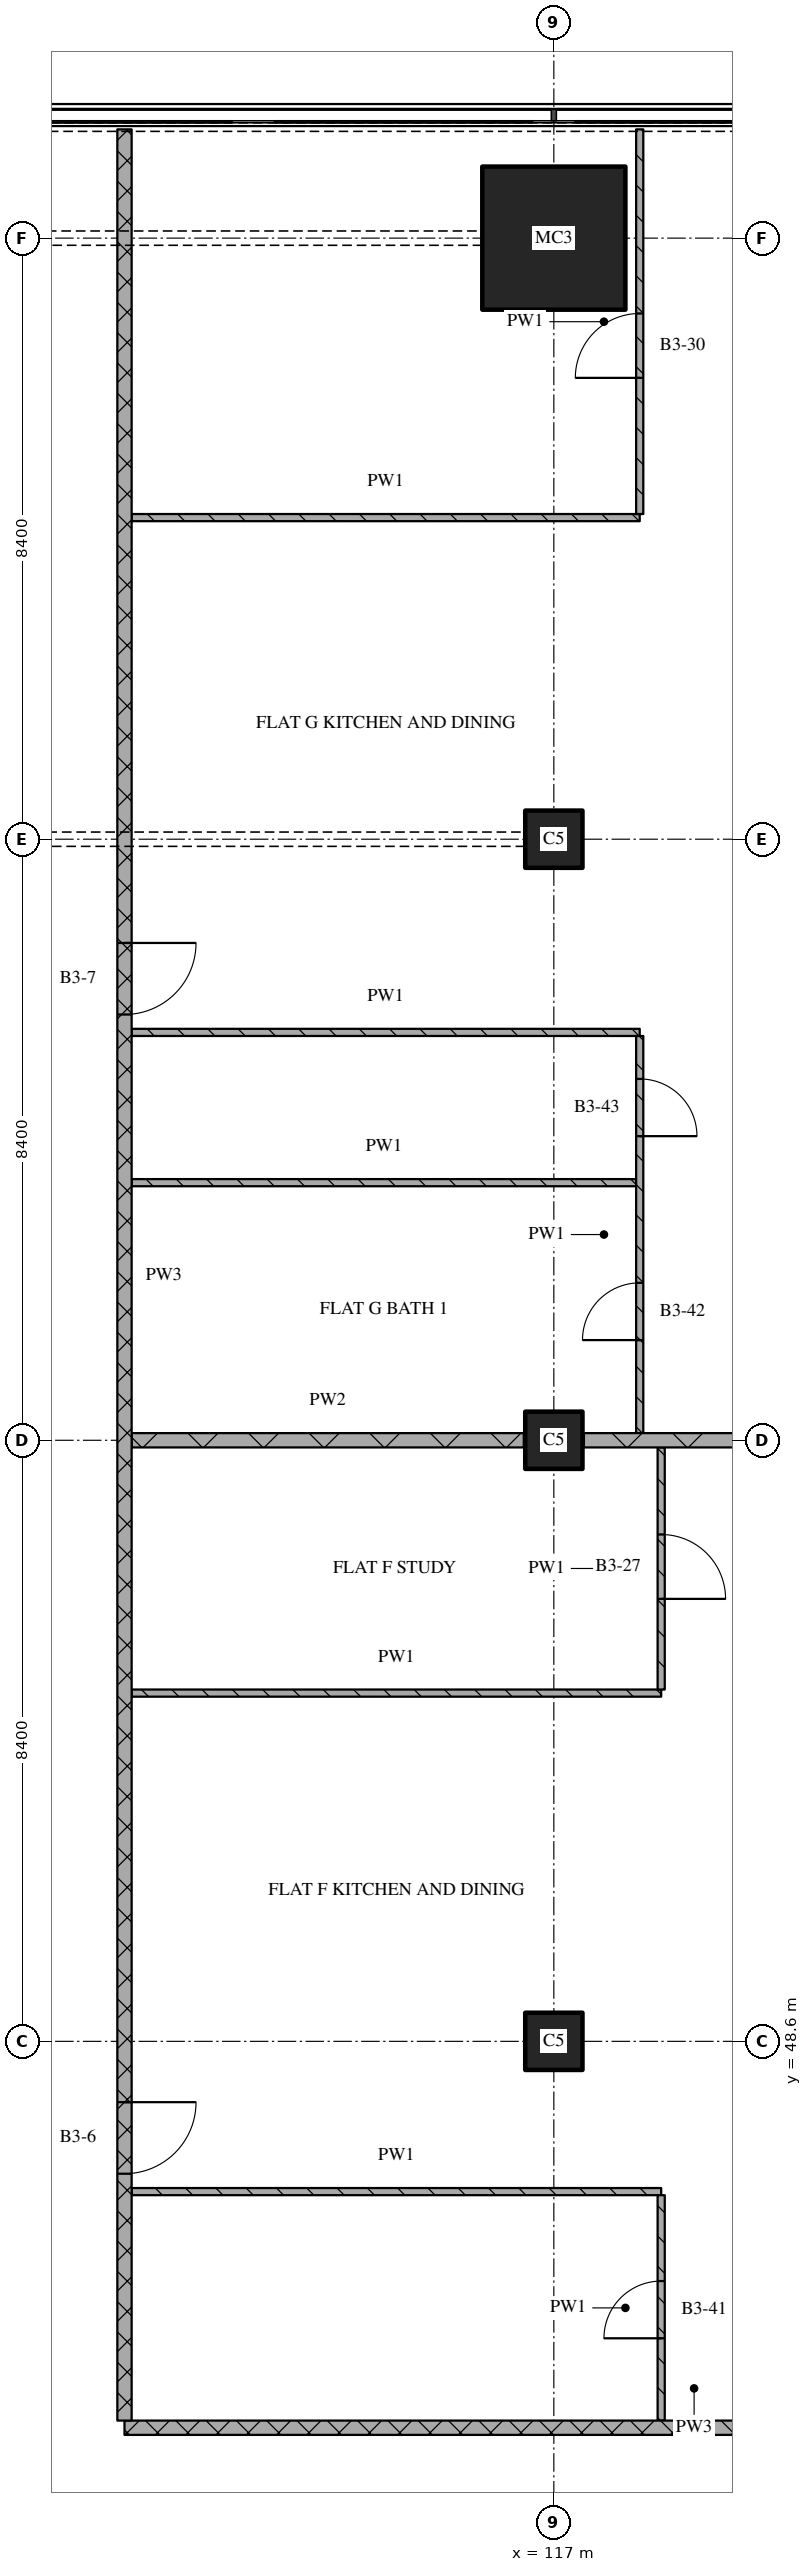
"""IFC4 building model, lengths in metres.
Left out: names, types, materials, properties, quantities, classifications, styles, units other than length and angle.
Written with IfcOpenShell. Run it as: python <this file> out.ifc"""

import sys

from ifc_helpers import new_model, si_unit, direction, frame, frame_2d, origin, origin_2d, place, context, subcontext, project, spatial, rectangle, extrude, element, fill, save


model = new_model("IFC4")
c1 = context("Model", 3, precision=1e-05, world=origin(), true_north=direction((0.0, 1.0)))
c2 = subcontext(c1, "Body", "Model", "MODEL_VIEW")
j1 = project(units=[si_unit("LENGTHUNIT", "METRE"), si_unit("PLANEANGLEUNIT", "RADIAN")], contexts=[c1])
p1 = place(None, origin())
s1 = spatial("IfcSite", under=j1, at=p1, CompositionType="ELEMENT")
p2 = place(p1, origin())
s2 = spatial("IfcBuilding", under=s1, at=p2, CompositionType="ELEMENT")
p3 = place(p2, frame((0.0, 0.0, 120.45)))
s3 = spatial("IfcBuildingStorey", under=s2, at=p3, CompositionType="ELEMENT", Elevation=120.45)
for number, where, z_axis, x_axis in (
    (1, (117.0, 48.6, 0.0), (0.0, 0.0, 1.0), (1.0, 0.0, 0.0)),
    (2, (117.0, 57.0, 0.0), (0.0, 0.0, 1.0), (1.0, 0.0, 0.0)),
    (3, (117.0, 65.4, 0.0), (0.0, 0.0, 1.0), (1.0, 0.0, 0.0)),
):
    element("IfcColumn", number, at=place(p3, frame(where, z_axis=z_axis, x_axis=x_axis)), inside=s3, PredefinedType="COLUMN", context=c2, shape_type="SweptSolid", body=[
        extrude(rectangle(XDim=0.8, YDim=0.8, at=origin_2d()), origin(), (0.0, 0.0, 1.0), 3.6),
    ])
p4 = place(p3, frame((117.0, 73.8, 0.0), z_axis=(0.0, 0.0, 1.0), x_axis=(1.0, 0.0, 0.0)))
e4 = element("IfcColumn", 4, at=p4, inside=s3, PredefinedType="COLUMN", context=c2, shape_type="SweptSolid", body=[
    extrude(rectangle(XDim=2.0, YDim=2.0, at=origin_2d()), origin(), (0.0, 0.0, 1.0), 3.6),
])
p5 = place(p3, frame((111.0, 43.2, 0.0), z_axis=(0.0, 0.0, 1.0), x_axis=(1.0, 0.0, 0.0)))
e5 = element("IfcWall", 5, at=p5, inside=s3, PredefinedType="PARTITIONING", context=c2, shape_type="SweptSolid", body=[
    extrude(rectangle(XDim=15.92, YDim=0.2, at=frame_2d((7.96, 0.0))), origin(), (0.0, 0.0, 1.0), 3.32),
])
for number, where, z_axis, x_axis in (
    (6, (111.1, 46.5, 0.0), (0.0, 0.0, 1.0), (1.0, 0.0, 0.0)),
    (7, (111.1, 53.467, 0.0), (0.0, 0.0, 1.0), (1.0, 0.0, 0.0)),
):
    element("IfcWall", number, at=place(p3, frame(where, z_axis=z_axis, x_axis=x_axis)), inside=s3, PredefinedType="PARTITIONING", context=c2, shape_type="SweptSolid", body=[
        extrude(rectangle(XDim=7.4, YDim=0.1, at=frame_2d((3.7, 0.0))), origin(), (0.0, 0.0, 1.0), 3.32),
    ])
p6 = place(p3, frame((111.1, 57.0, 0.0), z_axis=(0.0, 0.0, 1.0), x_axis=(1.0, 0.0, 0.0)))
e8 = element("IfcWall", 8, at=p6, inside=s3, PredefinedType="PARTITIONING", context=c2, shape_type="SweptSolid", body=[
    extrude(rectangle(XDim=5.48, YDim=0.2, at=frame_2d((2.74, 0.0))), origin(), (0.0, 0.0, 1.0), 3.32),
])
p7 = place(p3, frame((117.42, 57.0, 0.0), z_axis=(0.0, 0.0, 1.0), x_axis=(1.0, 0.0, 0.0)))
e9 = element("IfcWall", 9, at=p7, inside=s3, PredefinedType="PARTITIONING", context=c2, shape_type="SweptSolid", body=[
    extrude(rectangle(XDim=7.56, YDim=0.2, at=frame_2d((3.78, 0.0))), origin(), (0.0, 0.0, 1.0), 3.32),
])
p8 = place(p3, frame((111.1, 60.6, 0.0), z_axis=(0.0, 0.0, 1.0), x_axis=(1.0, 0.0, 0.0)))
e10 = element("IfcWall", 10, at=p8, inside=s3, PredefinedType="PARTITIONING", context=c2, shape_type="SweptSolid", body=[
    extrude(rectangle(XDim=7.05, YDim=0.1, at=frame_2d((3.525, 0.0))), origin(), (0.0, 0.0, 1.0), 3.32),
])
for number, where, z_axis, x_axis in (
    (11, (111.1, 62.7, 0.0), (0.0, 0.0, 1.0), (1.0, 0.0, 0.0)),
    (12, (111.1, 69.894, 0.0), (0.0, 0.0, 1.0), (1.0, 0.0, 0.0)),
):
    element("IfcWall", number, at=place(p3, frame(where, z_axis=z_axis, x_axis=x_axis)), inside=s3, PredefinedType="PARTITIONING", context=c2, shape_type="SweptSolid", body=[
        extrude(rectangle(XDim=7.1, YDim=0.1, at=frame_2d((3.55, 0.0))), origin(), (0.0, 0.0, 1.0), 3.32),
    ])
p9 = place(p3, frame((111.0, 75.32, 0.0), z_axis=(0.0, 0.0, 1.0), x_axis=(0.0, -1.0, 0.0)))
e13 = element("IfcWall", 13, at=p9, inside=s3, PredefinedType="PARTITIONING", context=c2, shape_type="SweptSolid", body=[
    extrude(rectangle(XDim=32.02, YDim=0.2, at=frame_2d((16.01, 0.0))), origin(), (0.0, 0.0, 1.0), 3.32),
])
p10 = place(p9, frame((11.37, 0.0, 0.0)))
e14 = element("IfcOpeningElement", 14, at=p10, cuts=e13, PredefinedType="OPENING", context=c2, shape_type="SweptSolid", body=[
    extrude(rectangle(XDim=1.0, YDim=2.1, at=frame_2d((0.5, 1.05))), frame((0.0, 0.11, 0.0), z_axis=(0.0, -1.0, 0.0), x_axis=(1.0, 0.0, 0.0)), (0.0, 0.0, 1.0), 0.22),
])
p11 = place(p9, frame((27.57, 0.0, 0.0)))
e15 = element("IfcOpeningElement", 15, at=p11, cuts=e13, PredefinedType="OPENING", context=c2, shape_type="SweptSolid", body=[
    extrude(rectangle(XDim=1.0, YDim=2.1, at=frame_2d((0.5, 1.05))), frame((0.0, 0.11, 0.0), z_axis=(0.0, -1.0, 0.0), x_axis=(1.0, 0.0, 0.0)), (0.0, 0.0, 1.0), 0.22),
])
p12 = place(p3, frame((118.2, 57.1, 0.0), z_axis=(0.0, 0.0, 1.0), x_axis=(0.0, 1.0, 0.0)))
e16 = element("IfcWall", 16, at=p12, inside=s3, PredefinedType="PARTITIONING", context=c2, shape_type="SweptSolid", body=[
    extrude(rectangle(XDim=5.55, YDim=0.1, at=frame_2d((2.775, 0.0))), origin(), (0.0, 0.0, 1.0), 3.32),
])
p13 = place(p12, frame((1.3, 0.0, 0.0)))
e17 = element("IfcOpeningElement", 17, at=p13, cuts=e16, PredefinedType="OPENING", context=c2, shape_type="SweptSolid", body=[
    extrude(rectangle(XDim=0.8, YDim=2.1, at=frame_2d((0.4, 1.05))), frame((0.0, 0.06, 0.0), z_axis=(0.0, -1.0, 0.0), x_axis=(1.0, 0.0, 0.0)), (0.0, 0.0, 1.0), 0.12),
])
p14 = place(p12, frame((4.15, 0.0, 0.0)))
e18 = element("IfcOpeningElement", 18, at=p14, cuts=e16, PredefinedType="OPENING", context=c2, shape_type="SweptSolid", body=[
    extrude(rectangle(XDim=0.8, YDim=2.1, at=frame_2d((0.4, 1.05))), frame((0.0, 0.06, 0.0), z_axis=(0.0, -1.0, 0.0), x_axis=(1.0, 0.0, 0.0)), (0.0, 0.0, 1.0), 0.12),
])
p15 = place(p3, frame((118.2, 69.944, 0.0), z_axis=(0.0, 0.0, 1.0), x_axis=(0.0, 1.0, 0.0)))
e19 = element("IfcWall", 19, at=p15, inside=s3, PredefinedType="PARTITIONING", context=c2, shape_type="SweptSolid", body=[
    extrude(rectangle(XDim=5.376, YDim=0.1, at=frame_2d((2.688, 0.0))), origin(), (0.0, 0.0, 1.0), 3.32),
])
p16 = place(p15, frame((1.903, 0.0, 0.0)))
e20 = element("IfcOpeningElement", 20, at=p16, cuts=e19, PredefinedType="OPENING", context=c2, shape_type="SweptSolid", body=[
    extrude(rectangle(XDim=0.9, YDim=2.1, at=frame_2d((0.45, 1.05))), frame((0.0, 0.06, 0.0), z_axis=(0.0, -1.0, 0.0), x_axis=(1.0, 0.0, 0.0)), (0.0, 0.0, 1.0), 0.12),
])
p17 = place(p3, frame((118.5, 43.3, 0.0), z_axis=(0.0, 0.0, 1.0), x_axis=(0.0, 1.0, 0.0)))
e21 = element("IfcWall", 21, at=p17, inside=s3, PredefinedType="PARTITIONING", context=c2, shape_type="SweptSolid", body=[
    extrude(rectangle(XDim=3.15, YDim=0.1, at=frame_2d((1.575, 0.0))), origin(), (0.0, 0.0, 1.0), 3.32),
])
p18 = place(p17, frame((1.15, 0.0, 0.0)))
e22 = element("IfcOpeningElement", 22, at=p18, cuts=e21, PredefinedType="OPENING", context=c2, shape_type="SweptSolid", body=[
    extrude(rectangle(XDim=0.8, YDim=2.1, at=frame_2d((0.4, 1.05))), frame((0.0, 0.06, 0.0), z_axis=(0.0, -1.0, 0.0), x_axis=(1.0, 0.0, 0.0)), (0.0, 0.0, 1.0), 0.12),
])
p19 = place(p3, frame((118.5, 53.517, 0.0), z_axis=(0.0, 0.0, 1.0), x_axis=(0.0, 1.0, 0.0)))
e23 = element("IfcWall", 23, at=p19, inside=s3, PredefinedType="PARTITIONING", context=c2, shape_type="SweptSolid", body=[
    extrude(rectangle(XDim=3.383, YDim=0.1, at=frame_2d((1.692, 0.0))), origin(), (0.0, 0.0, 1.0), 3.32),
])
p20 = place(p19, frame((1.267, 0.0, 0.0)))
e24 = element("IfcOpeningElement", 24, at=p20, cuts=e23, PredefinedType="OPENING", context=c2, shape_type="SweptSolid", body=[
    extrude(rectangle(XDim=0.9, YDim=2.1, at=frame_2d((0.45, 1.05))), frame((0.0, 0.06, 0.0), z_axis=(0.0, -1.0, 0.0), x_axis=(1.0, 0.0, 0.0)), (0.0, 0.0, 1.0), 0.12),
])
p21 = place(p10, origin())
e25 = element("IfcDoor", 25, at=p21, inside=s3, OperationType="SINGLE_SWING_LEFT", PredefinedType="DOOR", context=c2, shape_type="SweptSolid", body=[
    extrude(rectangle(XDim=1.0, YDim=2.1, at=frame_2d((0.5, 1.05))), frame((0.0, 0.025, 0.0), z_axis=(0.0, -1.0, 0.0), x_axis=(1.0, 0.0, 0.0)), (0.0, 0.0, 1.0), 0.05),
])
fill(e14, e25)
p22 = place(p11, origin())
e26 = element("IfcDoor", 26, at=p22, inside=s3, OperationType="SINGLE_SWING_LEFT", PredefinedType="DOOR", context=c2, shape_type="SweptSolid", body=[
    extrude(rectangle(XDim=1.0, YDim=2.1, at=frame_2d((0.5, 1.05))), frame((0.0, 0.025, 0.0), z_axis=(0.0, -1.0, 0.0), x_axis=(1.0, 0.0, 0.0)), (0.0, 0.0, 1.0), 0.05),
])
fill(e15, e26)
p23 = place(p13, origin())
e27 = element("IfcDoor", 27, at=p23, inside=s3, OperationType="SINGLE_SWING_LEFT", PredefinedType="DOOR", context=c2, shape_type="SweptSolid", body=[
    extrude(rectangle(XDim=0.8, YDim=2.1, at=frame_2d((0.4, 1.05))), frame((0.0, 0.025, 0.0), z_axis=(0.0, -1.0, 0.0), x_axis=(1.0, 0.0, 0.0)), (0.0, 0.0, 1.0), 0.05),
])
fill(e17, e27)
p24 = place(p14, origin())
e28 = element("IfcDoor", 28, at=p24, inside=s3, OperationType="SINGLE_SWING_RIGHT", PredefinedType="DOOR", context=c2, shape_type="SweptSolid", body=[
    extrude(rectangle(XDim=0.8, YDim=2.1, at=frame_2d((0.4, 1.05))), frame((0.0, 0.025, 0.0), z_axis=(0.0, -1.0, 0.0), x_axis=(1.0, 0.0, 0.0)), (0.0, 0.0, 1.0), 0.05),
])
fill(e18, e28)
p25 = place(p16, origin())
e29 = element("IfcDoor", 29, at=p25, inside=s3, OperationType="SINGLE_SWING_LEFT", PredefinedType="DOOR", context=c2, shape_type="SweptSolid", body=[
    extrude(rectangle(XDim=0.9, YDim=2.1, at=frame_2d((0.45, 1.05))), frame((0.0, 0.025, 0.0), z_axis=(0.0, -1.0, 0.0), x_axis=(1.0, 0.0, 0.0)), (0.0, 0.0, 1.0), 0.05),
])
fill(e20, e29)
p26 = place(p18, origin())
e30 = element("IfcDoor", 30, at=p26, inside=s3, OperationType="SINGLE_SWING_LEFT", PredefinedType="DOOR", context=c2, shape_type="SweptSolid", body=[
    extrude(rectangle(XDim=0.8, YDim=2.1, at=frame_2d((0.4, 1.05))), frame((0.0, 0.025, 0.0), z_axis=(0.0, -1.0, 0.0), x_axis=(1.0, 0.0, 0.0)), (0.0, 0.0, 1.0), 0.05),
])
fill(e22, e30)
p27 = place(p20, origin())
e31 = element("IfcDoor", 31, at=p27, inside=s3, OperationType="SINGLE_SWING_RIGHT", PredefinedType="DOOR", context=c2, shape_type="SweptSolid", body=[
    extrude(rectangle(XDim=0.9, YDim=2.1, at=frame_2d((0.45, 1.05))), frame((0.0, 0.025, 0.0), z_axis=(0.0, -1.0, 0.0), x_axis=(1.0, 0.0, 0.0)), (0.0, 0.0, 1.0), 0.05),
])
fill(e24, e31)
save(model, sys.argv[1])
